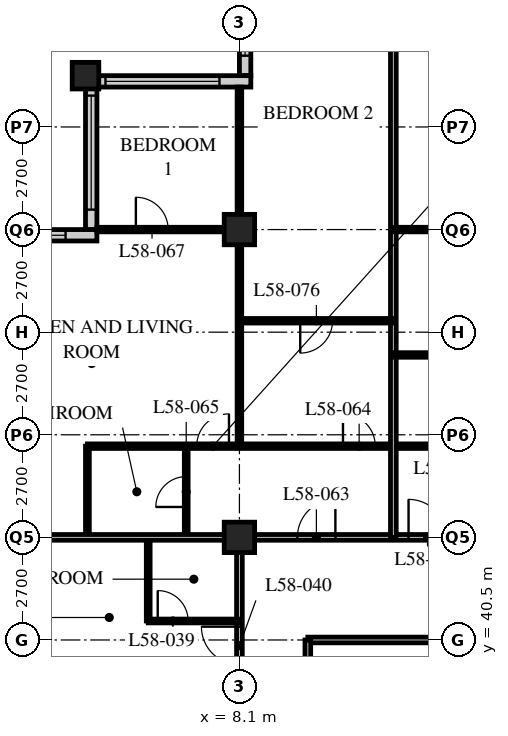
"""IFC4 building model, lengths in metres.
Left out: names, types, materials, properties, quantities, classifications, styles, units other than length and angle.
Written with IfcOpenShell. Run it as: python <this file> out.ifc"""

import sys

from ifc_helpers import new_model, si_unit, direction, frame, frame_2d, origin, origin_2d, place, context, subcontext, project, spatial, rectangle, hollow_rectangle, extrude, element, fill, save


model = new_model("IFC4")
c1 = context("Model", 3, precision=1e-05, world=origin(), true_north=direction((0.0, 1.0)))
c2 = subcontext(c1, "Body", "Model", "MODEL_VIEW")
j1 = project(units=[si_unit("LENGTHUNIT", "METRE"), si_unit("PLANEANGLEUNIT", "RADIAN")], contexts=[c1])
p1 = place(None, origin())
s1 = spatial("IfcSite", under=j1, at=p1, CompositionType="ELEMENT")
p2 = place(p1, origin())
s2 = spatial("IfcBuilding", under=s1, at=p2, CompositionType="ELEMENT")
p3 = place(p2, frame((0.0, 0.0, 224.4)))
s3 = spatial("IfcBuildingStorey", under=s2, at=p3, CompositionType="ELEMENT", Elevation=224.4)
p4 = place(p3, frame((4.05, 55.35, 0.0), z_axis=(0.0, 0.0, 1.0), x_axis=(1.0, 0.0, 0.0)))
e1 = element("IfcColumn", 1, at=p4, inside=s3, PredefinedType="COLUMN", context=c2, shape_type="SweptSolid", body=[
    extrude(hollow_rectangle(XDim=0.7, YDim=0.7, WallThickness=0.07, at=origin_2d()), origin(), (0.0, 0.0, 1.0), 3.6),
])
for number, where, z_axis, x_axis in (
    (2, (8.1, 43.2, 0.0), (0.0, 0.0, 1.0), (1.0, 0.0, 0.0)),
    (3, (8.1, 51.3, 0.0), (0.0, 0.0, 1.0), (1.0, 0.0, 0.0)),
):
    element("IfcColumn", number, at=place(p3, frame(where, z_axis=z_axis, x_axis=x_axis)), inside=s3, PredefinedType="COLUMN", context=c2, shape_type="SweptSolid", body=[
        extrude(hollow_rectangle(XDim=0.8, YDim=0.8, WallThickness=0.08, at=origin_2d()), origin(), (0.0, 0.0, 1.0), 3.6),
    ])
p5 = place(p3, frame((8.25, 59.1, 0.0), z_axis=(0.0, 0.0, 1.0), x_axis=(0.0, -1.0, 0.0)))
e4 = element("IfcWall", 4, at=p5, inside=s3, PredefinedType="SOLIDWALL", context=c2, shape_type="SweptSolid", body=[
    extrude(rectangle(XDim=3.75, YDim=0.3, at=frame_2d((1.875, 0.0))), origin(), (0.0, 0.0, 1.0), 3.39),
])
p6 = place(p5, frame((0.225, 0.0, 0.6)))
e5 = element("IfcOpeningElement", 5, at=p6, cuts=e4, PredefinedType="OPENING", context=c2, shape_type="SweptSolid", body=[
    extrude(rectangle(XDim=3.0, YDim=2.0, at=frame_2d((1.5, 1.0))), frame((0.0, 0.16, 0.0), z_axis=(0.0, -1.0, 0.0), x_axis=(1.0, 0.0, 0.0)), (0.0, 0.0, 1.0), 0.32),
])
p7 = place(p3, frame((8.4, 55.2, 0.0), z_axis=(0.0, 0.0, 1.0), x_axis=(-1.0, 0.0, 0.0)))
e6 = element("IfcWall", 6, at=p7, inside=s3, PredefinedType="SOLIDWALL", context=c2, shape_type="SweptSolid", body=[
    extrude(rectangle(XDim=4.35, YDim=0.3, at=frame_2d((2.175, 0.0))), origin(), (0.0, 0.0, 1.0), 3.39),
])
p8 = place(p7, frame((0.825, 0.0, 0.6)))
e7 = element("IfcOpeningElement", 7, at=p8, cuts=e6, PredefinedType="OPENING", context=c2, shape_type="SweptSolid", body=[
    extrude(rectangle(XDim=3.0, YDim=2.0, at=frame_2d((1.5, 1.0))), frame((0.0, 0.16, 0.0), z_axis=(0.0, -1.0, 0.0), x_axis=(1.0, 0.0, 0.0)), (0.0, 0.0, 1.0), 0.32),
])
p9 = place(p3, frame((4.2, 55.05, 0.0), z_axis=(0.0, 0.0, 1.0), x_axis=(0.0, -1.0, 0.0)))
e8 = element("IfcWall", 8, at=p9, inside=s3, PredefinedType="SOLIDWALL", context=c2, shape_type="SweptSolid", body=[
    extrude(rectangle(XDim=3.75, YDim=0.3, at=frame_2d((1.875, 0.0))), origin(), (0.0, 0.0, 1.0), 3.39),
])
p10 = place(p9, frame((0.225, 0.0, 0.6)))
e9 = element("IfcOpeningElement", 9, at=p10, cuts=e8, PredefinedType="OPENING", context=c2, shape_type="SweptSolid", body=[
    extrude(rectangle(XDim=3.0, YDim=2.0, at=frame_2d((1.5, 1.0))), frame((0.0, 0.16, 0.0), z_axis=(0.0, -1.0, 0.0), x_axis=(1.0, 0.0, 0.0)), (0.0, 0.0, 1.0), 0.32),
])
p11 = place(p3, frame((4.35, 51.15, 0.0), z_axis=(0.0, 0.0, 1.0), x_axis=(-1.0, 0.0, 0.0)))
e10 = element("IfcWall", 10, at=p11, inside=s3, PredefinedType="SOLIDWALL", context=c2, shape_type="SweptSolid", body=[
    extrude(rectangle(XDim=4.35, YDim=0.3, at=frame_2d((2.175, 0.0))), origin(), (0.0, 0.0, 1.0), 3.39),
])
p12 = place(p11, frame((0.825, 0.0, 0.6)))
e11 = element("IfcOpeningElement", 11, at=p12, cuts=e10, PredefinedType="OPENING", context=c2, shape_type="SweptSolid", body=[
    extrude(rectangle(XDim=3.0, YDim=2.0, at=frame_2d((1.5, 1.0))), frame((0.0, 0.16, 0.0), z_axis=(0.0, -1.0, 0.0), x_axis=(1.0, 0.0, 0.0)), (0.0, 0.0, 1.0), 0.32),
])
p13 = place(p3, frame((8.1, 43.2, 0.0), z_axis=(0.0, 0.0, 1.0), x_axis=(1.0, 0.0, 0.0)))
e12 = element("IfcWall", 12, at=p13, inside=s3, PredefinedType="PARTITIONING", context=c2, shape_type="SweptSolid", body=[
    extrude(rectangle(XDim=36.45, YDim=0.15, at=frame_2d((18.225, 0.0))), origin(), (0.0, 0.0, 1.0), 2.628),
])
p14 = place(p13, frame((4.45, 0.0, 0.0)))
e13 = element("IfcOpeningElement", 13, at=p14, cuts=e12, PredefinedType="OPENING", context=c2, shape_type="SweptSolid", body=[
    extrude(rectangle(XDim=1.0, YDim=2.1, at=frame_2d((0.5, 1.05))), frame((0.0, 0.085, 0.0), z_axis=(0.0, -1.0, 0.0), x_axis=(1.0, 0.0, 0.0)), (0.0, 0.0, 1.0), 0.17),
])
p15 = place(p13, frame((17.1, 0.0, 0.0)))
e14 = element("IfcOpeningElement", 14, at=p15, cuts=e12, PredefinedType="OPENING", context=c2, shape_type="SweptSolid", body=[
    extrude(rectangle(XDim=1.0, YDim=2.1, at=frame_2d((0.5, 1.05))), frame((0.0, 0.085, 0.0), z_axis=(0.0, -1.0, 0.0), x_axis=(1.0, 0.0, 0.0)), (0.0, 0.0, 1.0), 0.17),
])
p16 = place(p13, frame((29.05, 0.0, 0.0)))
e15 = element("IfcOpeningElement", 15, at=p16, cuts=e12, PredefinedType="OPENING", context=c2, shape_type="SweptSolid", body=[
    extrude(rectangle(XDim=1.0, YDim=2.1, at=frame_2d((0.5, 1.05))), frame((0.0, 0.085, 0.0), z_axis=(0.0, -1.0, 0.0), x_axis=(1.0, 0.0, 0.0)), (0.0, 0.0, 1.0), 0.17),
])
p17 = place(p13, frame((33.925, 0.0, 0.0)))
e16 = element("IfcOpeningElement", 16, at=p17, cuts=e12, PredefinedType="OPENING", context=c2, shape_type="SweptSolid", body=[
    extrude(rectangle(XDim=1.0, YDim=2.1, at=frame_2d((0.5, 1.05))), frame((0.0, 0.085, 0.0), z_axis=(0.0, -1.0, 0.0), x_axis=(1.0, 0.0, 0.0)), (0.0, 0.0, 1.0), 0.17),
])
p18 = place(p13, frame((1.525, 0.0, 0.0)))
e17 = element("IfcOpeningElement", 17, at=p18, cuts=e12, PredefinedType="OPENING", context=c2, shape_type="SweptSolid", body=[
    extrude(rectangle(XDim=1.0, YDim=2.1, at=frame_2d((0.5, 1.05))), frame((0.0, 0.085, 0.0), z_axis=(0.0, -1.0, 0.0), x_axis=(1.0, 0.0, 0.0)), (0.0, 0.0, 1.0), 0.17),
])
p19 = place(p3, frame((8.1, 18.9, 0.0), z_axis=(0.0, 0.0, 1.0), x_axis=(0.0, 1.0, 0.0)))
e18 = element("IfcWall", 18, at=p19, inside=s3, PredefinedType="PARTITIONING", context=c2, shape_type="SweptSolid", body=[
    extrude(rectangle(XDim=24.3, YDim=0.15, at=frame_2d((12.15, 0.0))), origin(), (0.0, 0.0, 1.0), 2.628),
])
p20 = place(p19, frame((0.9, 0.0, 0.0)))
e19 = element("IfcOpeningElement", 19, at=p20, cuts=e18, PredefinedType="OPENING", context=c2, shape_type="SweptSolid", body=[
    extrude(rectangle(XDim=1.0, YDim=2.1, at=frame_2d((0.5, 1.05))), frame((0.0, 0.085, 0.0), z_axis=(0.0, -1.0, 0.0), x_axis=(1.0, 0.0, 0.0)), (0.0, 0.0, 1.0), 0.17),
])
p21 = place(p19, frame((20.95, 0.0, 0.0)))
e20 = element("IfcOpeningElement", 20, at=p21, cuts=e18, PredefinedType="OPENING", context=c2, shape_type="SweptSolid", body=[
    extrude(rectangle(XDim=1.0, YDim=2.1, at=frame_2d((0.5, 1.05))), frame((0.0, 0.085, 0.0), z_axis=(0.0, -1.0, 0.0), x_axis=(1.0, 0.0, 0.0)), (0.0, 0.0, 1.0), 0.17),
])
p22 = place(p3, frame((16.0, 40.5, 0.0), z_axis=(0.0, 0.0, 1.0), x_axis=(-1.0, 0.0, 0.0)))
e21 = element("IfcWall", 21, at=p22, inside=s3, PredefinedType="PARTITIONING", context=c2, shape_type="SweptSolid", body=[
    extrude(rectangle(XDim=6.1, YDim=0.15, at=frame_2d((3.05, 0.0))), origin(), (0.0, 0.0, 1.0), 3.39),
])
p23 = place(p3, frame((9.9, 40.5, 0.0), z_axis=(0.0, 0.0, 1.0), x_axis=(0.0, -1.0, 0.0)))
e22 = element("IfcWall", 22, at=p23, inside=s3, PredefinedType="PARTITIONING", context=c2, shape_type="SweptSolid", body=[
    extrude(rectangle(XDim=19.8, YDim=0.15, at=frame_2d((9.9, 0.0))), origin(), (0.0, 0.0, 1.0), 3.39),
])
p24 = place(p23, frame((14.748, 0.0, 0.0)))
e23 = element("IfcOpeningElement", 23, at=p24, cuts=e22, PredefinedType="OPENING", context=c2, shape_type="SweptSolid", body=[
    extrude(rectangle(XDim=1.0, YDim=2.1, at=frame_2d((0.5, 1.05))), frame((0.0, 0.085, 0.0), z_axis=(0.0, -1.0, 0.0), x_axis=(1.0, 0.0, 0.0)), (0.0, 0.0, 1.0), 0.17),
])
p25 = place(p23, frame((10.698, 0.0, 0.0)))
e24 = element("IfcOpeningElement", 24, at=p25, cuts=e22, PredefinedType="OPENING", context=c2, shape_type="SweptSolid", body=[
    extrude(rectangle(XDim=1.0, YDim=2.1, at=frame_2d((0.5, 1.05))), frame((0.0, 0.085, 0.0), z_axis=(0.0, -1.0, 0.0), x_axis=(1.0, 0.0, 0.0)), (0.0, 0.0, 1.0), 0.17),
])
p26 = place(p23, frame((5.298, 0.0, 0.0)))
e25 = element("IfcOpeningElement", 25, at=p26, cuts=e22, PredefinedType="OPENING", context=c2, shape_type="SweptSolid", body=[
    extrude(rectangle(XDim=1.0, YDim=2.1, at=frame_2d((0.5, 1.05))), frame((0.0, 0.085, 0.0), z_axis=(0.0, -1.0, 0.0), x_axis=(1.0, 0.0, 0.0)), (0.0, 0.0, 1.0), 0.17),
])
p27 = place(p23, frame((1.248, 0.0, 0.0)))
e26 = element("IfcOpeningElement", 26, at=p27, cuts=e22, PredefinedType="OPENING", context=c2, shape_type="SweptSolid", body=[
    extrude(rectangle(XDim=1.0, YDim=2.1, at=frame_2d((0.5, 1.05))), frame((0.0, 0.085, 0.0), z_axis=(0.0, -1.0, 0.0), x_axis=(1.0, 0.0, 0.0)), (0.0, 0.0, 1.0), 0.17),
])
p28 = place(p3, frame((5.7, 41.0, 0.0), z_axis=(0.0, 0.0, 1.0), x_axis=(0.0, 1.0, 0.0)))
e27 = element("IfcWall", 27, at=p28, inside=s3, PredefinedType="PARTITIONING", context=c2, shape_type="SweptSolid", body=[
    extrude(rectangle(XDim=2.2, YDim=0.1, at=frame_2d((1.1, 0.0))), origin(), (0.0, 0.0, 1.0), 3.39),
])
p29 = place(p3, frame((8.1, 41.0, 0.0), z_axis=(0.0, 0.0, 1.0), x_axis=(-1.0, 0.0, 0.0)))
e28 = element("IfcWall", 28, at=p29, inside=s3, PredefinedType="PARTITIONING", context=c2, shape_type="SweptSolid", body=[
    extrude(rectangle(XDim=2.4, YDim=0.1, at=frame_2d((1.2, 0.0))), origin(), (0.0, 0.0, 1.0), 3.39),
])
p30 = place(p29, frame((1.35, 0.0, 0.0)))
e29 = element("IfcOpeningElement", 29, at=p30, cuts=e28, PredefinedType="OPENING", context=c2, shape_type="SweptSolid", body=[
    extrude(rectangle(XDim=0.8, YDim=2.1, at=frame_2d((0.4, 1.05))), frame((0.0, 0.06, 0.0), z_axis=(0.0, -1.0, 0.0), x_axis=(1.0, 0.0, 0.0)), (0.0, 0.0, 1.0), 0.12),
])
p31 = place(p3, frame((6.7, 43.2, 0.0), z_axis=(0.0, 0.0, 1.0), x_axis=(0.0, 1.0, 0.0)))
e30 = element("IfcWall", 30, at=p31, inside=s3, PredefinedType="PARTITIONING", context=c2, shape_type="SweptSolid", body=[
    extrude(rectangle(XDim=2.4, YDim=0.1, at=frame_2d((1.2, 0.0))), origin(), (0.0, 0.0, 1.0), 3.39),
])
p32 = place(p31, frame((0.8, 0.0, 0.0)))
e31 = element("IfcOpeningElement", 31, at=p32, cuts=e30, PredefinedType="OPENING", context=c2, shape_type="SweptSolid", body=[
    extrude(rectangle(XDim=0.8, YDim=2.1, at=frame_2d((0.4, 1.05))), frame((0.0, 0.06, 0.0), z_axis=(0.0, -1.0, 0.0), x_axis=(1.0, 0.0, 0.0)), (0.0, 0.0, 1.0), 0.12),
])
p33 = place(p3, frame((4.1, 43.2, 0.0), z_axis=(0.0, 0.0, 1.0), x_axis=(0.0, 1.0, 0.0)))
e32 = element("IfcWall", 32, at=p33, inside=s3, PredefinedType="PARTITIONING", context=c2, shape_type="SweptSolid", body=[
    extrude(rectangle(XDim=2.4, YDim=0.1, at=frame_2d((1.2, 0.0))), origin(), (0.0, 0.0, 1.0), 3.39),
])
p34 = place(p3, frame((4.1, 45.6, 0.0), z_axis=(0.0, 0.0, 1.0), x_axis=(1.0, 0.0, 0.0)))
e33 = element("IfcWall", 33, at=p34, inside=s3, PredefinedType="PARTITIONING", context=c2, shape_type="SweptSolid", body=[
    extrude(rectangle(XDim=32.35, YDim=0.12, at=frame_2d((16.175, 0.0))), origin(), (0.0, 0.0, 1.0), 3.39),
])
p35 = place(p34, frame((9.025, 0.0, 0.0)))
e34 = element("IfcOpeningElement", 34, at=p35, cuts=e33, PredefinedType="OPENING", context=c2, shape_type="SweptSolid", body=[
    extrude(rectangle(XDim=0.85, YDim=2.1, at=frame_2d((0.425, 1.05))), frame((0.0, 0.07, 0.0), z_axis=(0.0, -1.0, 0.0), x_axis=(1.0, 0.0, 0.0)), (0.0, 0.0, 1.0), 0.14),
])
p36 = place(p34, frame((16.475, 0.0, 0.0)))
e35 = element("IfcOpeningElement", 35, at=p36, cuts=e33, PredefinedType="OPENING", context=c2, shape_type="SweptSolid", body=[
    extrude(rectangle(XDim=0.85, YDim=2.1, at=frame_2d((0.425, 1.05))), frame((0.0, 0.07, 0.0), z_axis=(0.0, -1.0, 0.0), x_axis=(1.0, 0.0, 0.0)), (0.0, 0.0, 1.0), 0.14),
])
p37 = place(p34, frame((21.175, 0.0, 0.0)))
e36 = element("IfcOpeningElement", 36, at=p37, cuts=e33, PredefinedType="OPENING", context=c2, shape_type="SweptSolid", body=[
    extrude(rectangle(XDim=0.85, YDim=2.1, at=frame_2d((0.425, 1.05))), frame((0.0, 0.07, 0.0), z_axis=(0.0, -1.0, 0.0), x_axis=(1.0, 0.0, 0.0)), (0.0, 0.0, 1.0), 0.14),
])
p38 = place(p34, frame((28.625, 0.0, 0.0)))
e37 = element("IfcOpeningElement", 37, at=p38, cuts=e33, PredefinedType="OPENING", context=c2, shape_type="SweptSolid", body=[
    extrude(rectangle(XDim=0.85, YDim=2.1, at=frame_2d((0.425, 1.05))), frame((0.0, 0.07, 0.0), z_axis=(0.0, -1.0, 0.0), x_axis=(1.0, 0.0, 0.0)), (0.0, 0.0, 1.0), 0.14),
])
p39 = place(p34, frame((6.725, 0.0, 0.0)))
e38 = element("IfcOpeningElement", 38, at=p39, cuts=e33, PredefinedType="OPENING", context=c2, shape_type="SweptSolid", body=[
    extrude(rectangle(XDim=0.85, YDim=2.1, at=frame_2d((0.425, 1.05))), frame((0.0, 0.07, 0.0), z_axis=(0.0, -1.0, 0.0), x_axis=(1.0, 0.0, 0.0)), (0.0, 0.0, 1.0), 0.14),
])
p40 = place(p34, frame((2.875, 0.0, 0.0)))
e39 = element("IfcOpeningElement", 39, at=p40, cuts=e33, PredefinedType="OPENING", context=c2, shape_type="SweptSolid", body=[
    extrude(rectangle(XDim=0.85, YDim=2.1, at=frame_2d((0.425, 1.05))), frame((0.0, 0.07, 0.0), z_axis=(0.0, -1.0, 0.0), x_axis=(1.0, 0.0, 0.0)), (0.0, 0.0, 1.0), 0.14),
])
p41 = place(p3, frame((8.1, 45.6, 0.0), z_axis=(0.0, 0.0, 1.0), x_axis=(0.0, 1.0, 0.0)))
e40 = element("IfcWall", 40, at=p41, inside=s3, PredefinedType="PARTITIONING", context=c2, shape_type="SweptSolid", body=[
    extrude(rectangle(XDim=9.45, YDim=0.12, at=frame_2d((4.725, 0.0))), origin(), (0.0, 0.0, 1.0), 2.628),
])
p42 = place(p3, frame((8.1, 51.3, 0.0), z_axis=(0.0, 0.0, 1.0), x_axis=(-1.0, 0.0, 0.0)))
e41 = element("IfcWall", 41, at=p42, inside=s3, PredefinedType="PARTITIONING", context=c2, shape_type="SweptSolid", body=[
    extrude(rectangle(XDim=3.75, YDim=0.12, at=frame_2d((1.875, 0.0))), origin(), (0.0, 0.0, 1.0), 2.628),
])
p43 = place(p42, frame((1.875, 0.0, 0.0)))
e42 = element("IfcOpeningElement", 42, at=p43, cuts=e41, PredefinedType="OPENING", context=c2, shape_type="SweptSolid", body=[
    extrude(rectangle(XDim=0.85, YDim=2.1, at=frame_2d((0.425, 1.05))), frame((0.0, 0.07, 0.0), z_axis=(0.0, -1.0, 0.0), x_axis=(1.0, 0.0, 0.0)), (0.0, 0.0, 1.0), 0.14),
])
p44 = place(p3, frame((0.3, 43.2, 0.0), z_axis=(0.0, 0.0, 1.0), x_axis=(1.0, 0.0, 0.0)))
e43 = element("IfcWall", 43, at=p44, inside=s3, PredefinedType="PARTITIONING", context=c2, shape_type="SweptSolid", body=[
    extrude(rectangle(XDim=7.8, YDim=0.15, at=frame_2d((3.9, 0.0))), origin(), (0.0, 0.0, 1.0), 2.628),
])
p45 = place(p3, frame((12.15, 43.2, 0.0), z_axis=(0.0, 0.0, 1.0), x_axis=(0.0, 1.0, 0.0)))
e44 = element("IfcWall", 44, at=p45, inside=s3, PredefinedType="PARTITIONING", context=c2, shape_type="SweptSolid", body=[
    extrude(rectangle(XDim=15.9, YDim=0.15, at=frame_2d((7.95, 0.0))), origin(), (0.0, 0.0, 1.0), 3.39),
])
p46 = place(p3, frame((12.15, 48.0, 0.0), z_axis=(0.0, 0.0, 1.0), x_axis=(1.0, 0.0, 0.0)))
e45 = element("IfcWall", 45, at=p46, inside=s3, PredefinedType="PARTITIONING", context=c2, shape_type="SweptSolid", body=[
    extrude(rectangle(XDim=8.1, YDim=0.12, at=frame_2d((4.05, 0.0))), origin(), (0.0, 0.0, 1.0), 3.39),
])
p47 = place(p46, frame((3.625, 0.0, 0.0)))
e46 = element("IfcOpeningElement", 46, at=p47, cuts=e45, PredefinedType="OPENING", context=c2, shape_type="SweptSolid", body=[
    extrude(rectangle(XDim=0.85, YDim=2.1, at=frame_2d((0.425, 1.05))), frame((0.0, 0.07, 0.0), z_axis=(0.0, -1.0, 0.0), x_axis=(1.0, 0.0, 0.0)), (0.0, 0.0, 1.0), 0.14),
])
p48 = place(p3, frame((8.1, 48.9, 0.0), z_axis=(0.0, 0.0, 1.0), x_axis=(1.0, 0.0, 0.0)))
e47 = element("IfcWall", 47, at=p48, inside=s3, PredefinedType="PARTITIONING", context=c2, shape_type="SweptSolid", body=[
    extrude(rectangle(XDim=4.05, YDim=0.12, at=frame_2d((2.025, 0.0))), origin(), (0.0, 0.0, 1.0), 3.39),
])
p49 = place(p48, frame((1.6, 0.0, 0.0)))
e48 = element("IfcOpeningElement", 48, at=p49, cuts=e47, PredefinedType="OPENING", context=c2, shape_type="SweptSolid", body=[
    extrude(rectangle(XDim=0.85, YDim=2.1, at=frame_2d((0.425, 1.05))), frame((0.0, 0.07, 0.0), z_axis=(0.0, -1.0, 0.0), x_axis=(1.0, 0.0, 0.0)), (0.0, 0.0, 1.0), 0.14),
])
p50 = place(p3, frame((12.15, 51.3, 0.0), z_axis=(0.0, 0.0, 1.0), x_axis=(1.0, 0.0, 0.0)))
e49 = element("IfcWall", 49, at=p50, inside=s3, PredefinedType="PARTITIONING", context=c2, shape_type="SweptSolid", body=[
    extrude(rectangle(XDim=3.65, YDim=0.12, at=frame_2d((1.825, 0.0))), origin(), (0.0, 0.0, 1.0), 2.628),
])
p51 = place(p6, origin())
e50 = element("IfcWindow", 50, at=p51, inside=s3, PartitioningType="SINGLE_PANEL", PredefinedType="WINDOW", context=c2, shape_type="SweptSolid", body=[
    extrude(rectangle(XDim=3.0, YDim=2.0, at=frame_2d((1.5, 1.0))), frame((0.0, 0.03, 0.0), z_axis=(0.0, -1.0, 0.0), x_axis=(1.0, 0.0, 0.0)), (0.0, 0.0, 1.0), 0.06),
])
fill(e5, e50)
p52 = place(p8, origin())
e51 = element("IfcWindow", 51, at=p52, inside=s3, PartitioningType="SINGLE_PANEL", PredefinedType="WINDOW", context=c2, shape_type="SweptSolid", body=[
    extrude(rectangle(XDim=3.0, YDim=2.0, at=frame_2d((1.5, 1.0))), frame((0.0, 0.03, 0.0), z_axis=(0.0, -1.0, 0.0), x_axis=(1.0, 0.0, 0.0)), (0.0, 0.0, 1.0), 0.06),
])
fill(e7, e51)
p53 = place(p10, origin())
e52 = element("IfcWindow", 52, at=p53, inside=s3, PartitioningType="SINGLE_PANEL", PredefinedType="WINDOW", context=c2, shape_type="SweptSolid", body=[
    extrude(rectangle(XDim=3.0, YDim=2.0, at=frame_2d((1.5, 1.0))), frame((0.0, 0.03, 0.0), z_axis=(0.0, -1.0, 0.0), x_axis=(1.0, 0.0, 0.0)), (0.0, 0.0, 1.0), 0.06),
])
fill(e9, e52)
p54 = place(p12, origin())
e53 = element("IfcWindow", 53, at=p54, inside=s3, PartitioningType="SINGLE_PANEL", PredefinedType="WINDOW", context=c2, shape_type="SweptSolid", body=[
    extrude(rectangle(XDim=3.0, YDim=2.0, at=frame_2d((1.5, 1.0))), frame((0.0, 0.03, 0.0), z_axis=(0.0, -1.0, 0.0), x_axis=(1.0, 0.0, 0.0)), (0.0, 0.0, 1.0), 0.06),
])
fill(e11, e53)
p55 = place(p14, origin())
e54 = element("IfcDoor", 54, at=p55, inside=s3, OperationType="SINGLE_SWING_LEFT", PredefinedType="DOOR", context=c2, shape_type="SweptSolid", body=[
    extrude(rectangle(XDim=1.0, YDim=2.1, at=frame_2d((0.5, 1.05))), frame((0.0, 0.025, 0.0), z_axis=(0.0, -1.0, 0.0), x_axis=(1.0, 0.0, 0.0)), (0.0, 0.0, 1.0), 0.05),
])
fill(e13, e54)
p56 = place(p30, origin())
e55 = element("IfcDoor", 55, at=p56, inside=s3, OperationType="SINGLE_SWING_LEFT", PredefinedType="DOOR", context=c2, shape_type="SweptSolid", body=[
    extrude(rectangle(XDim=0.8, YDim=2.1, at=frame_2d((0.4, 1.05))), frame((0.0, 0.025, 0.0), z_axis=(0.0, -1.0, 0.0), x_axis=(1.0, 0.0, 0.0)), (0.0, 0.0, 1.0), 0.05),
])
fill(e29, e55)
p57 = place(p21, origin())
e56 = element("IfcDoor", 56, at=p57, inside=s3, OperationType="SINGLE_SWING_RIGHT", PredefinedType="DOOR", context=c2, shape_type="SweptSolid", body=[
    extrude(rectangle(XDim=1.0, YDim=2.1, at=frame_2d((0.5, 1.05))), frame((0.0, 0.025, 0.0), z_axis=(0.0, -1.0, 0.0), x_axis=(1.0, 0.0, 0.0)), (0.0, 0.0, 1.0), 0.05),
])
fill(e20, e56)
p58 = place(p18, origin())
e57 = element("IfcDoor", 57, at=p58, inside=s3, OperationType="SINGLE_SWING_RIGHT", PredefinedType="DOOR", context=c2, shape_type="SweptSolid", body=[
    extrude(rectangle(XDim=1.0, YDim=2.1, at=frame_2d((0.5, 1.05))), frame((0.0, 0.025, 0.0), z_axis=(0.0, -1.0, 0.0), x_axis=(1.0, 0.0, 0.0)), (0.0, 0.0, 1.0), 0.05),
])
fill(e17, e57)
p59 = place(p39, origin())
e58 = element("IfcDoor", 58, at=p59, inside=s3, OperationType="SINGLE_SWING_LEFT", PredefinedType="DOOR", context=c2, shape_type="SweptSolid", body=[
    extrude(rectangle(XDim=0.85, YDim=2.1, at=frame_2d((0.425, 1.05))), frame((0.0, 0.025, 0.0), z_axis=(0.0, -1.0, 0.0), x_axis=(1.0, 0.0, 0.0)), (0.0, 0.0, 1.0), 0.05),
])
fill(e38, e58)
p60 = place(p32, origin())
e59 = element("IfcDoor", 59, at=p60, inside=s3, OperationType="SINGLE_SWING_LEFT", PredefinedType="DOOR", context=c2, shape_type="SweptSolid", body=[
    extrude(rectangle(XDim=0.8, YDim=2.1, at=frame_2d((0.4, 1.05))), frame((0.0, 0.025, 0.0), z_axis=(0.0, -1.0, 0.0), x_axis=(1.0, 0.0, 0.0)), (0.0, 0.0, 1.0), 0.05),
])
fill(e31, e59)
p61 = place(p40, origin())
e60 = element("IfcDoor", 60, at=p61, inside=s3, OperationType="SINGLE_SWING_RIGHT", PredefinedType="DOOR", context=c2, shape_type="SweptSolid", body=[
    extrude(rectangle(XDim=0.85, YDim=2.1, at=frame_2d((0.425, 1.05))), frame((0.0, 0.025, 0.0), z_axis=(0.0, -1.0, 0.0), x_axis=(1.0, 0.0, 0.0)), (0.0, 0.0, 1.0), 0.05),
])
fill(e39, e60)
p62 = place(p43, origin())
e61 = element("IfcDoor", 61, at=p62, inside=s3, OperationType="SINGLE_SWING_LEFT", PredefinedType="DOOR", context=c2, shape_type="SweptSolid", body=[
    extrude(rectangle(XDim=0.85, YDim=2.1, at=frame_2d((0.425, 1.05))), frame((0.0, 0.025, 0.0), z_axis=(0.0, -1.0, 0.0), x_axis=(1.0, 0.0, 0.0)), (0.0, 0.0, 1.0), 0.05),
])
fill(e42, e61)
p63 = place(p49, origin())
e62 = element("IfcDoor", 62, at=p63, inside=s3, OperationType="SINGLE_SWING_RIGHT", PredefinedType="DOOR", context=c2, shape_type="SweptSolid", body=[
    extrude(rectangle(XDim=0.85, YDim=2.1, at=frame_2d((0.425, 1.05))), frame((0.0, 0.025, 0.0), z_axis=(0.0, -1.0, 0.0), x_axis=(1.0, 0.0, 0.0)), (0.0, 0.0, 1.0), 0.05),
])
fill(e48, e62)
save(model, sys.argv[1])
